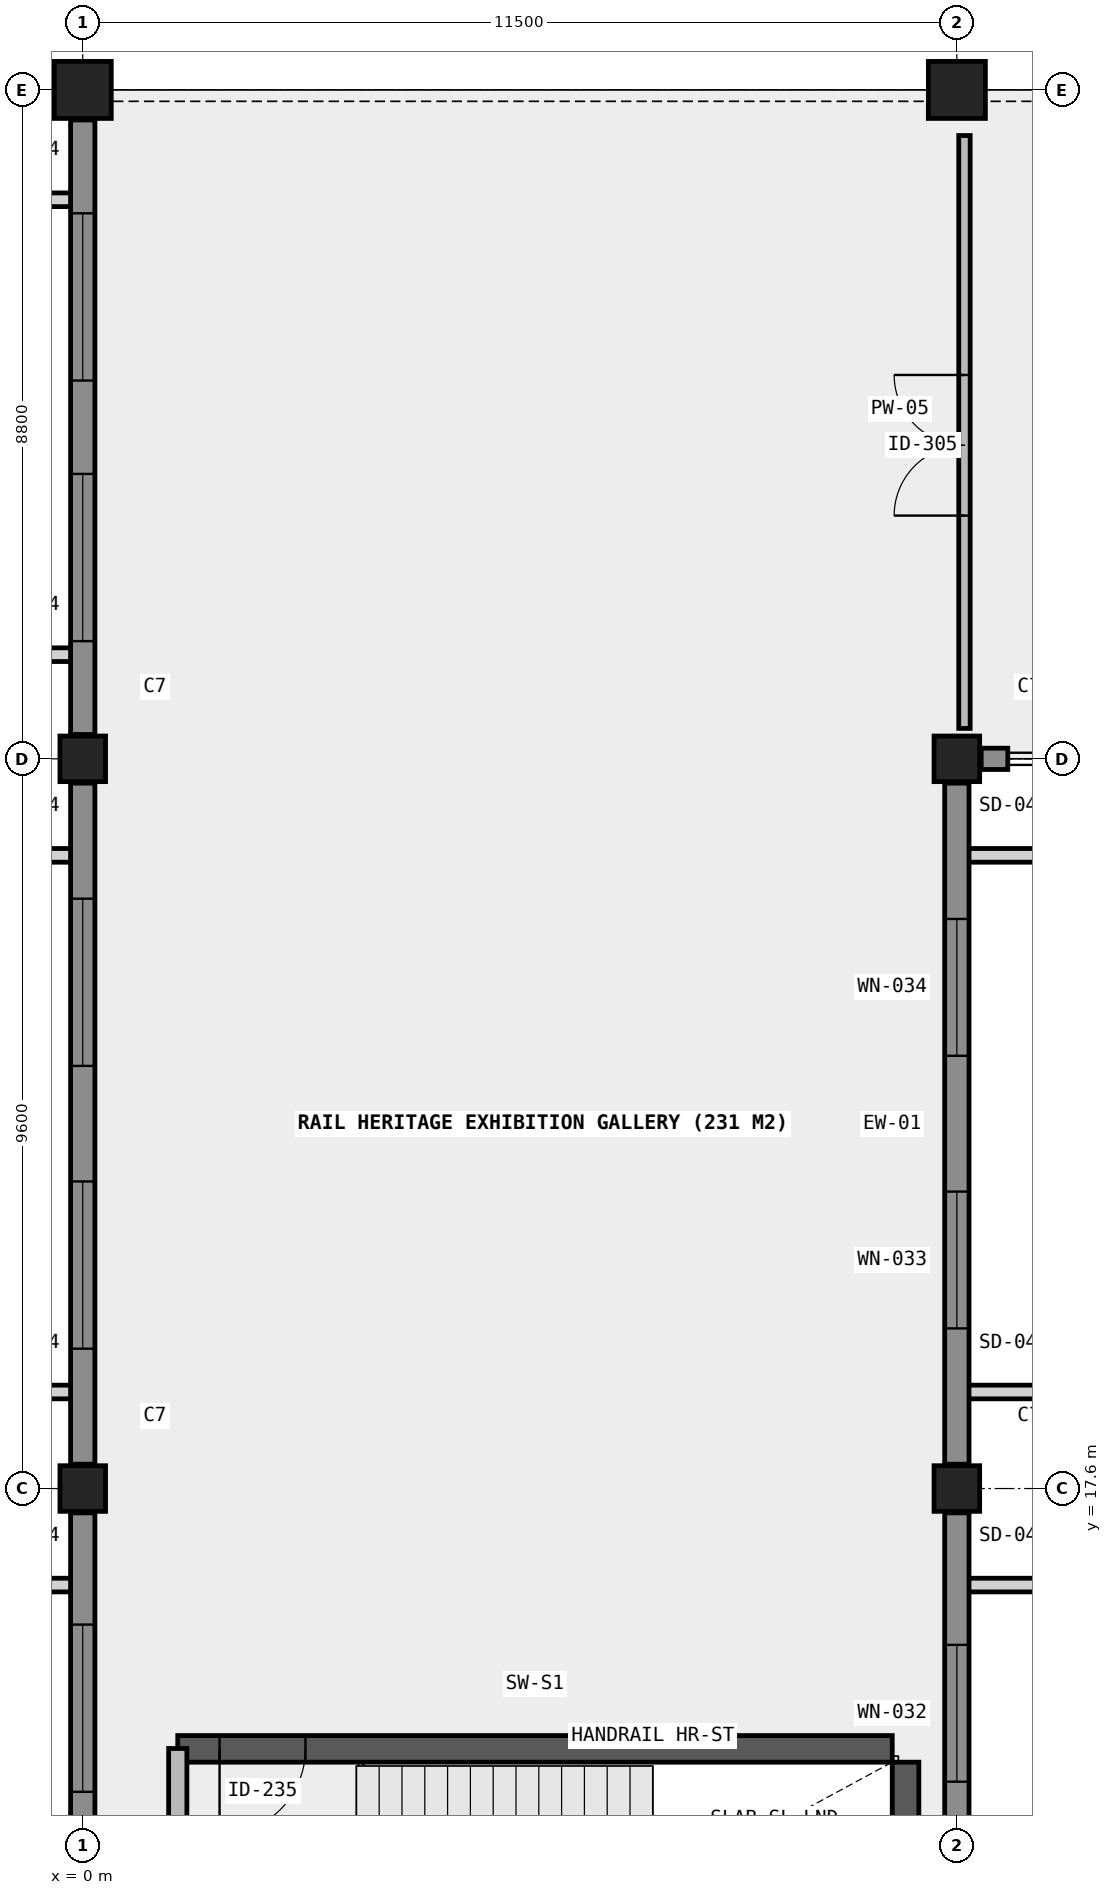
"""IFC4 building model, lengths in metres.
Left out: names, types, materials, properties, quantities, classifications, styles, units other than length and angle.
Written with IfcOpenShell. Run it as: python <this file> out.ifc"""

import sys

from ifc_helpers import new_model, si_unit, direction, frame, frame_2d, origin, origin_2d, place, context, subcontext, project, spatial, rectangle, extrude, element, fill, save


model = new_model("IFC4")
c1 = context("Model", 3, precision=1e-05, world=origin(), true_north=direction((0.0, 1.0)))
c2 = subcontext(c1, "Body", "Model", "MODEL_VIEW")
j1 = project(units=[si_unit("LENGTHUNIT", "METRE"), si_unit("PLANEANGLEUNIT", "RADIAN")], contexts=[c1])
p1 = place(None, origin())
s1 = spatial("IfcSite", under=j1, at=p1, CompositionType="ELEMENT")
p2 = place(p1, origin())
s2 = spatial("IfcBuilding", under=s1, at=p2, CompositionType="ELEMENT")
p3 = place(p2, frame((0.0, 0.0, 4.2)))
s3 = spatial("IfcBuildingStorey", under=s2, at=p3, CompositionType="ELEMENT", Elevation=4.2)
for number, where, z_axis, x_axis in (
    (1, (0.0, 17.6, 0.0), (0.0, 0.0, 1.0), (1.0, 0.0, 0.0)),
    (2, (0.0, 27.2, 0.0), (0.0, 0.0, 1.0), (1.0, 0.0, 0.0)),
):
    element("IfcColumn", number, at=place(p3, frame(where, z_axis=z_axis, x_axis=x_axis)), inside=s3, PredefinedType="COLUMN", context=c2, shape_type="SweptSolid", body=[
        extrude(rectangle(XDim=0.6, YDim=0.6, at=origin_2d()), origin(), (0.0, 0.0, 1.0), 4.2),
    ])
p4 = place(p3, frame((0.0, 36.0, 0.0), z_axis=(0.0, 0.0, 1.0), x_axis=(1.0, 0.0, 0.0)))
e3 = element("IfcColumn", 3, at=p4, inside=s3, PredefinedType="COLUMN", context=c2, shape_type="SweptSolid", body=[
    extrude(rectangle(XDim=0.75, YDim=0.75, at=origin_2d()), origin(), (0.0, 0.0, 1.0), 4.2),
])
for number, where, z_axis, x_axis in (
    (4, (11.5, 17.6, 0.0), (0.0, 0.0, 1.0), (1.0, 0.0, 0.0)),
    (5, (11.5, 27.2, 0.0), (0.0, 0.0, 1.0), (1.0, 0.0, 0.0)),
):
    element("IfcColumn", number, at=place(p3, frame(where, z_axis=z_axis, x_axis=x_axis)), inside=s3, PredefinedType="COLUMN", context=c2, shape_type="SweptSolid", body=[
        extrude(rectangle(XDim=0.6, YDim=0.6, at=origin_2d()), origin(), (0.0, 0.0, 1.0), 4.2),
    ])
p5 = place(p3, frame((11.5, 36.0, 0.0), z_axis=(0.0, 0.0, 1.0), x_axis=(1.0, 0.0, 0.0)))
e6 = element("IfcColumn", 6, at=p5, inside=s3, PredefinedType="COLUMN", context=c2, shape_type="SweptSolid", body=[
    extrude(rectangle(XDim=0.75, YDim=0.75, at=origin_2d()), origin(), (0.0, 0.0, 1.0), 4.2),
])
p6 = place(p3, frame((1.25, 14.175, 0.0), z_axis=(0.0, 0.0, 1.0), x_axis=(1.0, 0.0, 0.0)))
e7 = element("IfcWall", 7, at=p6, inside=s3, PredefinedType="SHEAR", context=c2, shape_type="SweptSolid", body=[
    extrude(rectangle(XDim=9.4, YDim=0.35, at=frame_2d((4.7, 0.0))), origin(), (0.0, 0.0, 1.0), 4.2),
])
p7 = place(p6, frame((0.55, 0.0, 0.0)))
e8 = element("IfcOpeningElement", 8, at=p7, cuts=e7, PredefinedType="OPENING", context=c2, shape_type="SweptSolid", body=[
    extrude(rectangle(XDim=1.13, YDim=2.15, at=frame_2d((0.565, 1.075))), frame((0.0, 0.185, 0.0), z_axis=(0.0, -1.0, 0.0), x_axis=(1.0, 0.0, 0.0)), (0.0, 0.0, 1.0), 0.37),
])
p8 = place(p3, frame((10.825, 10.2, 0.0), z_axis=(0.0, 0.0, 1.0), x_axis=(0.0, 1.0, 0.0)))
e9 = element("IfcWall", 9, at=p8, inside=s3, PredefinedType="SHEAR", context=c2, shape_type="SweptSolid", body=[
    extrude(rectangle(XDim=3.8, YDim=0.35, at=frame_2d((1.9, 0.0))), origin(), (0.0, 0.0, 1.0), 4.2),
])
p9 = place(p3, frame((11.5, 8.47, 0.0), z_axis=(0.0, 0.0, 1.0), x_axis=(0.0, 1.0, 0.0)))
e10 = element("IfcWall", 10, at=p9, inside=s3, PredefinedType="SOLIDWALL", context=c2, shape_type="SweptSolid", body=[
    extrude(rectangle(XDim=8.81, YDim=0.32, at=frame_2d((4.405, 0.0))), origin(), (0.0, 0.0, 1.0), 2.95),
])
p10 = place(p9, frame((1.737, 0.0, 0.85)))
e11 = element("IfcOpeningElement", 11, at=p10, cuts=e10, PredefinedType="OPENING", context=c2, shape_type="SweptSolid", body=[
    extrude(rectangle(XDim=1.8, YDim=1.8, at=frame_2d((0.9, 0.9))), frame((0.0, 0.17, 0.0), z_axis=(0.0, -1.0, 0.0), x_axis=(1.0, 0.0, 0.0)), (0.0, 0.0, 1.0), 0.34),
])
p11 = place(p9, frame((5.273, 0.0, 0.85)))
e12 = element("IfcOpeningElement", 12, at=p11, cuts=e10, PredefinedType="OPENING", context=c2, shape_type="SweptSolid", body=[
    extrude(rectangle(XDim=1.8, YDim=1.8, at=frame_2d((0.9, 0.9))), frame((0.0, 0.17, 0.0), z_axis=(0.0, -1.0, 0.0), x_axis=(1.0, 0.0, 0.0)), (0.0, 0.0, 1.0), 0.34),
])
p12 = place(p3, frame((11.5, 17.92, 0.0), z_axis=(0.0, 0.0, 1.0), x_axis=(0.0, 1.0, 0.0)))
e13 = element("IfcWall", 13, at=p12, inside=s3, PredefinedType="SOLIDWALL", context=c2, shape_type="SweptSolid", body=[
    extrude(rectangle(XDim=8.96, YDim=0.32, at=frame_2d((4.48, 0.0))), origin(), (0.0, 0.0, 1.0), 2.95),
])
p13 = place(p12, frame((1.787, 0.0, 0.85)))
e14 = element("IfcOpeningElement", 14, at=p13, cuts=e13, PredefinedType="OPENING", context=c2, shape_type="SweptSolid", body=[
    extrude(rectangle(XDim=1.8, YDim=1.8, at=frame_2d((0.9, 0.9))), frame((0.0, 0.17, 0.0), z_axis=(0.0, -1.0, 0.0), x_axis=(1.0, 0.0, 0.0)), (0.0, 0.0, 1.0), 0.34),
])
p14 = place(p12, frame((5.373, 0.0, 0.85)))
e15 = element("IfcOpeningElement", 15, at=p14, cuts=e13, PredefinedType="OPENING", context=c2, shape_type="SweptSolid", body=[
    extrude(rectangle(XDim=1.8, YDim=1.8, at=frame_2d((0.9, 0.9))), frame((0.0, 0.17, 0.0), z_axis=(0.0, -1.0, 0.0), x_axis=(1.0, 0.0, 0.0)), (0.0, 0.0, 1.0), 0.34),
])
p15 = place(p3, frame((11.82, 27.2, 0.0), z_axis=(0.0, 0.0, 1.0), x_axis=(1.0, 0.0, 0.0)))
e16 = element("IfcWall", 16, at=p15, inside=s3, PredefinedType="SOLIDWALL", context=c2, shape_type="SweptSolid", body=[
    extrude(rectangle(XDim=0.35, YDim=0.28, at=frame_2d((0.175, 0.0))), origin(), (0.0, 0.0, 1.0), 3.84),
])
p16 = place(p3, frame((0.0, 8.47, 0.0), z_axis=(0.0, 0.0, 1.0), x_axis=(0.0, 1.0, 0.0)))
e17 = element("IfcWall", 17, at=p16, inside=s3, PredefinedType="SOLIDWALL", context=c2, shape_type="SweptSolid", body=[
    extrude(rectangle(XDim=8.81, YDim=0.32, at=frame_2d((4.405, 0.0))), origin(), (0.0, 0.0, 1.0), 3.15),
])
p17 = place(p16, frame((1.47, 0.0, 0.85)))
e18 = element("IfcOpeningElement", 18, at=p17, cuts=e17, PredefinedType="OPENING", context=c2, shape_type="SweptSolid", body=[
    extrude(rectangle(XDim=2.2, YDim=1.8, at=frame_2d((1.1, 0.9))), frame((0.0, 0.17, 0.0), z_axis=(0.0, -1.0, 0.0), x_axis=(1.0, 0.0, 0.0)), (0.0, 0.0, 1.0), 0.34),
])
p18 = place(p16, frame((5.14, 0.0, 0.85)))
e19 = element("IfcOpeningElement", 19, at=p18, cuts=e17, PredefinedType="OPENING", context=c2, shape_type="SweptSolid", body=[
    extrude(rectangle(XDim=2.2, YDim=1.8, at=frame_2d((1.1, 0.9))), frame((0.0, 0.17, 0.0), z_axis=(0.0, -1.0, 0.0), x_axis=(1.0, 0.0, 0.0)), (0.0, 0.0, 1.0), 0.34),
])
p19 = place(p3, frame((0.0, 17.92, 0.0), z_axis=(0.0, 0.0, 1.0), x_axis=(0.0, 1.0, 0.0)))
e20 = element("IfcWall", 20, at=p19, inside=s3, PredefinedType="SOLIDWALL", context=c2, shape_type="SweptSolid", body=[
    extrude(rectangle(XDim=8.96, YDim=0.32, at=frame_2d((4.48, 0.0))), origin(), (0.0, 0.0, 1.0), 3.15),
])
p20 = place(p19, frame((1.52, 0.0, 0.85)))
e21 = element("IfcOpeningElement", 21, at=p20, cuts=e20, PredefinedType="OPENING", context=c2, shape_type="SweptSolid", body=[
    extrude(rectangle(XDim=2.2, YDim=1.8, at=frame_2d((1.1, 0.9))), frame((0.0, 0.17, 0.0), z_axis=(0.0, -1.0, 0.0), x_axis=(1.0, 0.0, 0.0)), (0.0, 0.0, 1.0), 0.34),
])
p21 = place(p19, frame((5.24, 0.0, 0.85)))
e22 = element("IfcOpeningElement", 22, at=p21, cuts=e20, PredefinedType="OPENING", context=c2, shape_type="SweptSolid", body=[
    extrude(rectangle(XDim=2.2, YDim=1.8, at=frame_2d((1.1, 0.9))), frame((0.0, 0.17, 0.0), z_axis=(0.0, -1.0, 0.0), x_axis=(1.0, 0.0, 0.0)), (0.0, 0.0, 1.0), 0.34),
])
p22 = place(p3, frame((0.0, 27.52, 0.0), z_axis=(0.0, 0.0, 1.0), x_axis=(0.0, 1.0, 0.0)))
e23 = element("IfcWall", 23, at=p22, inside=s3, PredefinedType="SOLIDWALL", context=c2, shape_type="SweptSolid", body=[
    extrude(rectangle(XDim=8.085, YDim=0.32, at=frame_2d((4.042, 0.0))), origin(), (0.0, 0.0, 1.0), 3.15),
])
p23 = place(p22, frame((1.228, 0.0, 0.85)))
e24 = element("IfcOpeningElement", 24, at=p23, cuts=e23, PredefinedType="OPENING", context=c2, shape_type="SweptSolid", body=[
    extrude(rectangle(XDim=2.2, YDim=1.8, at=frame_2d((1.1, 0.9))), frame((0.0, 0.17, 0.0), z_axis=(0.0, -1.0, 0.0), x_axis=(1.0, 0.0, 0.0)), (0.0, 0.0, 1.0), 0.34),
])
p24 = place(p22, frame((4.657, 0.0, 0.85)))
e25 = element("IfcOpeningElement", 25, at=p24, cuts=e23, PredefinedType="OPENING", context=c2, shape_type="SweptSolid", body=[
    extrude(rectangle(XDim=2.2, YDim=1.8, at=frame_2d((1.1, 0.9))), frame((0.0, 0.17, 0.0), z_axis=(0.0, -1.0, 0.0), x_axis=(1.0, 0.0, 0.0)), (0.0, 0.0, 1.0), 0.34),
])
p25 = place(p3, frame((1.25, 10.02, 0.0), z_axis=(0.0, 0.0, 1.0), x_axis=(0.0, 1.0, 0.0)))
e26 = element("IfcWall", 26, at=p25, inside=s3, PredefinedType="SOLIDWALL", context=c2, shape_type="SweptSolid", body=[
    extrude(rectangle(XDim=4.16, YDim=0.24, at=frame_2d((2.08, 0.0))), origin(), (0.0, 0.0, 1.0), 3.84),
])
p26 = place(p3, frame((11.6, 27.6, 0.0), z_axis=(0.0, 0.0, 1.0), x_axis=(0.0, 1.0, 0.0)))
e27 = element("IfcWall", 27, at=p26, inside=s3, PredefinedType="PARTITIONING", context=c2, shape_type="SweptSolid", body=[
    extrude(rectangle(XDim=7.8, YDim=0.15, at=frame_2d((3.9, 0.0))), origin(), (0.0, 0.0, 1.0), 2.95),
])
p27 = place(p26, frame((2.8, 0.0, 0.0)))
e28 = element("IfcOpeningElement", 28, at=p27, cuts=e27, PredefinedType="OPENING", context=c2, shape_type="SweptSolid", body=[
    extrude(rectangle(XDim=1.85, YDim=2.25, at=frame_2d((0.925, 1.125))), frame((0.0, 0.085, 0.0), z_axis=(0.0, -1.0, 0.0), x_axis=(1.0, 0.0, 0.0)), (0.0, 0.0, 1.0), 0.17),
])
p28 = place(p11, origin())
e29 = element("IfcWindow", 29, at=p28, inside=s3, PartitioningType="SINGLE_PANEL", PredefinedType="WINDOW", context=c2, shape_type="SweptSolid", body=[
    extrude(rectangle(XDim=1.8, YDim=1.8, at=frame_2d((0.9, 0.9))), frame((0.0, 0.03, 0.0), z_axis=(0.0, -1.0, 0.0), x_axis=(1.0, 0.0, 0.0)), (0.0, 0.0, 1.0), 0.06),
])
fill(e12, e29)
p29 = place(p13, origin())
e30 = element("IfcWindow", 30, at=p29, inside=s3, PartitioningType="SINGLE_PANEL", PredefinedType="WINDOW", context=c2, shape_type="SweptSolid", body=[
    extrude(rectangle(XDim=1.8, YDim=1.8, at=frame_2d((0.9, 0.9))), frame((0.0, 0.03, 0.0), z_axis=(0.0, -1.0, 0.0), x_axis=(1.0, 0.0, 0.0)), (0.0, 0.0, 1.0), 0.06),
])
fill(e14, e30)
p30 = place(p14, origin())
e31 = element("IfcWindow", 31, at=p30, inside=s3, PartitioningType="SINGLE_PANEL", PredefinedType="WINDOW", context=c2, shape_type="SweptSolid", body=[
    extrude(rectangle(XDim=1.8, YDim=1.8, at=frame_2d((0.9, 0.9))), frame((0.0, 0.03, 0.0), z_axis=(0.0, -1.0, 0.0), x_axis=(1.0, 0.0, 0.0)), (0.0, 0.0, 1.0), 0.06),
])
fill(e15, e31)
p31 = place(p18, origin())
e32 = element("IfcWindow", 32, at=p31, inside=s3, PartitioningType="SINGLE_PANEL", PredefinedType="WINDOW", context=c2, shape_type="SweptSolid", body=[
    extrude(rectangle(XDim=2.2, YDim=1.8, at=frame_2d((1.1, 0.9))), frame((0.0, 0.03, 0.0), z_axis=(0.0, -1.0, 0.0), x_axis=(1.0, 0.0, 0.0)), (0.0, 0.0, 1.0), 0.06),
])
fill(e19, e32)
p32 = place(p20, origin())
e33 = element("IfcWindow", 33, at=p32, inside=s3, PartitioningType="SINGLE_PANEL", PredefinedType="WINDOW", context=c2, shape_type="SweptSolid", body=[
    extrude(rectangle(XDim=2.2, YDim=1.8, at=frame_2d((1.1, 0.9))), frame((0.0, 0.03, 0.0), z_axis=(0.0, -1.0, 0.0), x_axis=(1.0, 0.0, 0.0)), (0.0, 0.0, 1.0), 0.06),
])
fill(e21, e33)
p33 = place(p21, origin())
e34 = element("IfcWindow", 34, at=p33, inside=s3, PartitioningType="SINGLE_PANEL", PredefinedType="WINDOW", context=c2, shape_type="SweptSolid", body=[
    extrude(rectangle(XDim=2.2, YDim=1.8, at=frame_2d((1.1, 0.9))), frame((0.0, 0.03, 0.0), z_axis=(0.0, -1.0, 0.0), x_axis=(1.0, 0.0, 0.0)), (0.0, 0.0, 1.0), 0.06),
])
fill(e22, e34)
p34 = place(p23, origin())
e35 = element("IfcWindow", 35, at=p34, inside=s3, PartitioningType="SINGLE_PANEL", PredefinedType="WINDOW", context=c2, shape_type="SweptSolid", body=[
    extrude(rectangle(XDim=2.2, YDim=1.8, at=frame_2d((1.1, 0.9))), frame((0.0, 0.03, 0.0), z_axis=(0.0, -1.0, 0.0), x_axis=(1.0, 0.0, 0.0)), (0.0, 0.0, 1.0), 0.06),
])
fill(e24, e35)
p35 = place(p24, origin())
e36 = element("IfcWindow", 36, at=p35, inside=s3, PartitioningType="SINGLE_PANEL", PredefinedType="WINDOW", context=c2, shape_type="SweptSolid", body=[
    extrude(rectangle(XDim=2.2, YDim=1.8, at=frame_2d((1.1, 0.9))), frame((0.0, 0.03, 0.0), z_axis=(0.0, -1.0, 0.0), x_axis=(1.0, 0.0, 0.0)), (0.0, 0.0, 1.0), 0.06),
])
fill(e25, e36)
p36 = place(p7, frame((0.565, 0.0, 0.0), z_axis=(0.0, 0.0, 1.0), x_axis=(-1.0, 0.0, 0.0)))
e37 = element("IfcDoor", 37, at=p36, inside=s3, OperationType="SINGLE_SWING_LEFT", PredefinedType="DOOR", context=c2, shape_type="SweptSolid", body=[
    extrude(rectangle(XDim=1.13, YDim=2.15, at=frame_2d((0.0, 1.075))), frame((0.0, 0.025, 0.0), z_axis=(0.0, -1.0, 0.0), x_axis=(1.0, 0.0, 0.0)), (0.0, 0.0, 1.0), 0.05),
])
fill(e8, e37)
p37 = place(p27, origin())
e38 = element("IfcDoor", 38, at=p37, inside=s3, OperationType="DOUBLE_DOOR_SINGLE_SWING", PredefinedType="DOOR", context=c2, shape_type="SweptSolid", body=[
    extrude(rectangle(XDim=1.85, YDim=2.25, at=frame_2d((0.925, 1.125))), frame((0.0, 0.025, 0.0), z_axis=(0.0, -1.0, 0.0), x_axis=(1.0, 0.0, 0.0)), (0.0, 0.0, 1.0), 0.05),
])
fill(e28, e38)
save(model, sys.argv[1])
